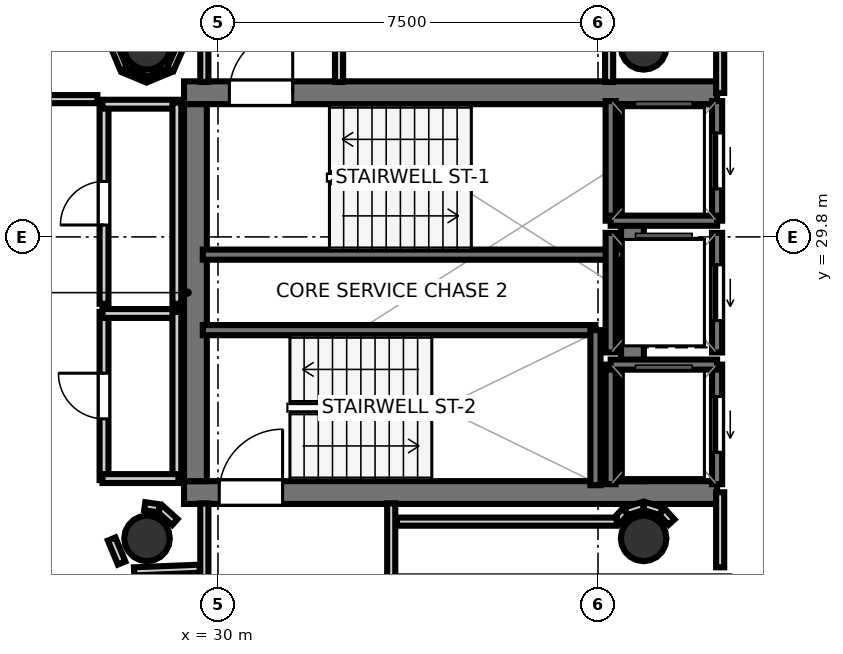
"""IFC4 building model, lengths in metres.
Left out: names, types, materials, properties, quantities, classifications, styles, units other than length and angle.
Written with IfcOpenShell. Run it as: python <this file> out.ifc"""

import sys

from ifc_helpers import new_model, si_unit, direction, frame, frame_2d, origin, origin_2d, place, context, subcontext, project, spatial, rectangle, hollow_circle, extrude, element, fill, save


model = new_model("IFC4")
c1 = context("Model", 3, precision=1e-05, world=origin(), true_north=direction((0.0, 1.0)))
c2 = subcontext(c1, "Body", "Model", "MODEL_VIEW")
j1 = project(units=[si_unit("LENGTHUNIT", "METRE"), si_unit("PLANEANGLEUNIT", "RADIAN")], contexts=[c1])
p1 = place(None, origin())
s1 = spatial("IfcSite", under=j1, at=p1, CompositionType="ELEMENT")
p2 = place(p1, origin())
s2 = spatial("IfcBuilding", under=s1, at=p2, CompositionType="ELEMENT")
p3 = place(p2, frame((0.0, 0.0, 288.0)))
s3 = spatial("IfcBuildingStorey", under=s2, at=p3, CompositionType="ELEMENT", Elevation=288.0)
p4 = place(p3, frame((29.33, 32.645, 0.0), z_axis=(0.0, 0.0, 1.0), x_axis=(1.0, 0.0, 0.0)))
e1 = element("IfcWall", 1, at=p4, inside=s3, PredefinedType="SHEAR", context=c2, shape_type="SweptSolid", body=[
    extrude(rectangle(XDim=10.52, YDim=0.45, at=frame_2d((5.26, 0.0))), origin(), (0.0, 0.0, 1.0), 3.52),
])
p5 = place(p4, frame((0.895, 0.0, 0.0)))
e2 = element("IfcOpeningElement", 2, at=p5, cuts=e1, PredefinedType="OPENING", context=c2, shape_type="SweptSolid", body=[
    extrude(rectangle(XDim=1.25, YDim=2.15, at=frame_2d((0.625, 1.075))), frame((0.0, 0.235, 0.0), z_axis=(0.0, -1.0, 0.0), x_axis=(1.0, 0.0, 0.0)), (0.0, 0.0, 1.0), 0.47),
])
p6 = place(p3, frame((29.33, 24.755, 0.0), z_axis=(0.0, 0.0, 1.0), x_axis=(1.0, 0.0, 0.0)))
e3 = element("IfcWall", 3, at=p6, inside=s3, PredefinedType="SHEAR", context=c2, shape_type="SweptSolid", body=[
    extrude(rectangle(XDim=10.52, YDim=0.45, at=frame_2d((5.26, 0.0))), origin(), (0.0, 0.0, 1.0), 3.52),
])
p7 = place(p6, frame((0.695, 0.0, 0.0)))
e4 = element("IfcOpeningElement", 4, at=p7, cuts=e3, PredefinedType="OPENING", context=c2, shape_type="SweptSolid", body=[
    extrude(rectangle(XDim=1.25, YDim=2.15, at=frame_2d((0.625, 1.075))), frame((0.0, 0.235, 0.0), z_axis=(0.0, -1.0, 0.0), x_axis=(1.0, 0.0, 0.0)), (0.0, 0.0, 1.0), 0.47),
])
for number, where, z_axis, x_axis in (
    (5, (29.555, 24.98, 0.0), (0.0, 0.0, 1.0), (0.0, 1.0, 0.0)),
    (6, (38.18, 24.98, 0.0), (0.0, 0.0, 1.0), (0.0, 1.0, 0.0)),
):
    element("IfcWall", number, at=place(p3, frame(where, z_axis=z_axis, x_axis=x_axis)), inside=s3, PredefinedType="SHEAR", context=c2, shape_type="SweptSolid", body=[
        extrude(rectangle(XDim=7.44, YDim=0.45, at=frame_2d((3.72, 0.0))), origin(), (0.0, 0.0, 1.0), 3.52),
    ])
for number, where, z_axis, x_axis in (
    (7, (28.6, 33.55, 0.0), (0.0, 0.0, 1.0), (1.0, 0.0, 0.0)),
    (8, (28.6, 23.85, 0.0), (0.0, 0.0, 1.0), (1.0, 0.0, 0.0)),
    (9, (38.4, 33.55, 0.0), (0.0, 0.0, 1.0), (1.0, 0.0, 0.0)),
    (10, (38.4, 23.85, 0.0), (0.0, 0.0, 1.0), (1.0, 0.0, 0.0)),
):
    element("IfcColumn", number, at=place(p3, frame(where, z_axis=z_axis, x_axis=x_axis)), inside=s3, PredefinedType="COLUMN", context=c2, shape_type="SweptSolid", body=[
        extrude(hollow_circle(Radius=0.45, WallThickness=0.025, at=origin_2d()), origin(), (0.0, 0.0, 1.0), 3.7),
    ])
p8 = place(p3, frame((29.7, 29.45, 0.0), z_axis=(0.0, 0.0, 1.0), x_axis=(1.0, 0.0, 0.0)))
e11 = element("IfcWall", 11, at=p8, inside=s3, PredefinedType="SOLIDWALL", context=c2, shape_type="SweptSolid", body=[
    extrude(rectangle(XDim=8.3, YDim=0.2, at=frame_2d((4.15, 0.0))), origin(), (0.0, 0.0, 1.0), 3.52),
])
p9 = place(p3, frame((29.7, 27.96, 0.0), z_axis=(0.0, 0.0, 1.0), x_axis=(1.0, 0.0, 0.0)))
e12 = element("IfcWall", 12, at=p9, inside=s3, PredefinedType="SOLIDWALL", context=c2, shape_type="SweptSolid", body=[
    extrude(rectangle(XDim=7.75, YDim=0.2, at=frame_2d((3.875, 0.0))), origin(), (0.0, 0.0, 1.0), 3.52),
])
p10 = place(p3, frame((37.45, 24.9, 0.0), z_axis=(0.0, 0.0, 1.0), x_axis=(0.0, 1.0, 0.0)))
e13 = element("IfcWall", 13, at=p10, inside=s3, PredefinedType="SOLIDWALL", context=c2, shape_type="SweptSolid", body=[
    extrude(rectangle(XDim=3.06, YDim=0.2, at=frame_2d((1.53, 0.0))), origin(), (0.0, 0.0, 1.0), 3.52),
])
p11 = place(p3, frame((39.85, 30.12, 0.0), z_axis=(0.0, 0.0, 1.0), x_axis=(0.0, 1.0, 0.0)))
e14 = element("IfcWall", 14, at=p11, inside=s3, PredefinedType="SOLIDWALL", context=c2, shape_type="SweptSolid", body=[
    extrude(rectangle(XDim=2.36, YDim=0.2, at=frame_2d((1.18, 0.0))), origin(), (0.0, 0.0, 1.0), 3.52),
])
p12 = place(p11, frame((0.63, 0.0, 0.0)))
e15 = element("IfcOpeningElement", 15, at=p12, cuts=e14, PredefinedType="OPENING", context=c2, shape_type="SweptSolid", body=[
    extrude(rectangle(XDim=1.1, YDim=2.15, at=frame_2d((0.55, 1.075))), frame((0.0, 0.11, 0.0), z_axis=(0.0, -1.0, 0.0), x_axis=(1.0, 0.0, 0.0)), (0.0, 0.0, 1.0), 0.22),
])
p13 = place(p3, frame((37.75, 30.12, 0.0), z_axis=(0.0, 0.0, 1.0), x_axis=(0.0, 1.0, 0.0)))
e16 = element("IfcWall", 16, at=p13, inside=s3, PredefinedType="SOLIDWALL", context=c2, shape_type="SweptSolid", body=[
    extrude(rectangle(XDim=2.36, YDim=0.2, at=frame_2d((1.18, 0.0))), origin(), (0.0, 0.0, 1.0), 3.52),
])
p14 = place(p3, frame((37.75, 30.12, 0.0), z_axis=(0.0, 0.0, 1.0), x_axis=(1.0, 0.0, 0.0)))
e17 = element("IfcWall", 17, at=p14, inside=s3, PredefinedType="SOLIDWALL", context=c2, shape_type="SweptSolid", body=[
    extrude(rectangle(XDim=2.1, YDim=0.2, at=frame_2d((1.05, 0.0))), origin(), (0.0, 0.0, 1.0), 3.52),
])
p15 = place(p3, frame((39.85, 24.92, 0.0), z_axis=(0.0, 0.0, 1.0), x_axis=(0.0, 1.0, 0.0)))
e18 = element("IfcWall", 18, at=p15, inside=s3, PredefinedType="SOLIDWALL", context=c2, shape_type="SweptSolid", body=[
    extrude(rectangle(XDim=2.36, YDim=0.2, at=frame_2d((1.18, 0.0))), origin(), (0.0, 0.0, 1.0), 3.52),
])
p16 = place(p15, frame((0.63, 0.0, 0.0)))
e19 = element("IfcOpeningElement", 19, at=p16, cuts=e18, PredefinedType="OPENING", context=c2, shape_type="SweptSolid", body=[
    extrude(rectangle(XDim=1.1, YDim=2.15, at=frame_2d((0.55, 1.075))), frame((0.0, 0.11, 0.0), z_axis=(0.0, -1.0, 0.0), x_axis=(1.0, 0.0, 0.0)), (0.0, 0.0, 1.0), 0.22),
])
p17 = place(p3, frame((37.75, 24.92, 0.0), z_axis=(0.0, 0.0, 1.0), x_axis=(0.0, 1.0, 0.0)))
e20 = element("IfcWall", 20, at=p17, inside=s3, PredefinedType="SOLIDWALL", context=c2, shape_type="SweptSolid", body=[
    extrude(rectangle(XDim=2.36, YDim=0.2, at=frame_2d((1.18, 0.0))), origin(), (0.0, 0.0, 1.0), 3.52),
])
p18 = place(p3, frame((37.75, 27.28, 0.0), z_axis=(0.0, 0.0, 1.0), x_axis=(1.0, 0.0, 0.0)))
e21 = element("IfcWall", 21, at=p18, inside=s3, PredefinedType="SOLIDWALL", context=c2, shape_type="SweptSolid", body=[
    extrude(rectangle(XDim=2.1, YDim=0.2, at=frame_2d((1.05, 0.0))), origin(), (0.0, 0.0, 1.0), 3.52),
])
p19 = place(p3, frame((39.85, 27.52, 0.0), z_axis=(0.0, 0.0, 1.0), x_axis=(0.0, 1.0, 0.0)))
e22 = element("IfcWall", 22, at=p19, inside=s3, PredefinedType="SOLIDWALL", context=c2, shape_type="SweptSolid", body=[
    extrude(rectangle(XDim=2.36, YDim=0.2, at=frame_2d((1.18, 0.0))), origin(), (0.0, 0.0, 1.0), 3.52),
])
p20 = place(p19, frame((0.63, 0.0, 0.0)))
e23 = element("IfcOpeningElement", 23, at=p20, cuts=e22, PredefinedType="OPENING", context=c2, shape_type="SweptSolid", body=[
    extrude(rectangle(XDim=1.1, YDim=2.15, at=frame_2d((0.55, 1.075))), frame((0.0, 0.11, 0.0), z_axis=(0.0, -1.0, 0.0), x_axis=(1.0, 0.0, 0.0)), (0.0, 0.0, 1.0), 0.22),
])
p21 = place(p3, frame((37.75, 27.52, 0.0), z_axis=(0.0, 0.0, 1.0), x_axis=(0.0, 1.0, 0.0)))
e24 = element("IfcWall", 24, at=p21, inside=s3, PredefinedType="SOLIDWALL", context=c2, shape_type="SweptSolid", body=[
    extrude(rectangle(XDim=2.36, YDim=0.2, at=frame_2d((1.18, 0.0))), origin(), (0.0, 0.0, 1.0), 3.52),
])
p22 = place(p3, frame((29.731, 32.858, 0.0), z_axis=(0.0, 0.0, 1.0), x_axis=(0.0, 1.0, 0.0)))
e25 = element("IfcWall", 25, at=p22, inside=s3, PredefinedType="PARTITIONING", context=c2, shape_type="SweptSolid", body=[
    extrude(rectangle(XDim=3.053, YDim=0.16, at=frame_2d((1.526, 0.0))), origin(), (0.0, 0.0, 1.0), 2.84),
])
p23 = place(p3, frame((32.389, 36.29, 0.0), z_axis=(0.0, 0.0, 1.0), x_axis=(0.0, -1.0, 0.0)))
e26 = element("IfcWall", 26, at=p23, inside=s3, PredefinedType="PARTITIONING", context=c2, shape_type="SweptSolid", body=[
    extrude(rectangle(XDim=3.432, YDim=0.16, at=frame_2d((1.716, 0.0))), origin(), (0.0, 0.0, 1.0), 2.84),
])
for number, where, z_axis, x_axis in (
    (27, (29.731, 21.85, 0.0), (0.0, 0.0, 1.0), (0.0, 1.0, 0.0)),
    (28, (33.419, 24.542, 0.0), (0.0, 0.0, 1.0), (0.0, -1.0, 0.0)),
):
    element("IfcWall", number, at=place(p3, frame(where, z_axis=z_axis, x_axis=x_axis)), inside=s3, PredefinedType="PARTITIONING", context=c2, shape_type="SweptSolid", body=[
        extrude(rectangle(XDim=2.692, YDim=0.16, at=frame_2d((1.346, 0.0))), origin(), (0.0, 0.0, 1.0), 2.84),
    ])
p24 = place(p3, frame((39.911, 23.28, 0.0), z_axis=(0.0, 0.0, 1.0), x_axis=(0.0, 1.0, 0.0)))
e29 = element("IfcWall", 29, at=p24, inside=s3, PredefinedType="PARTITIONING", context=c2, shape_type="SweptSolid", body=[
    extrude(rectangle(XDim=1.48, YDim=0.16, at=frame_2d((0.74, 0.0))), origin(), (0.0, 0.0, 1.0), 2.84),
])
p25 = place(p3, frame((39.911, 32.64, 0.0), z_axis=(0.0, 0.0, 1.0), x_axis=(0.0, 1.0, 0.0)))
e30 = element("IfcWall", 30, at=p25, inside=s3, PredefinedType="PARTITIONING", context=c2, shape_type="SweptSolid", body=[
    extrude(rectangle(XDim=2.88, YDim=0.16, at=frame_2d((1.44, 0.0))), origin(), (0.0, 0.0, 1.0), 2.84),
])
p26 = place(p3, frame((27.751, 25.0, 0.0), z_axis=(0.0, 0.0, 1.0), x_axis=(0.0, 1.0, 0.0)))
e31 = element("IfcWall", 31, at=p26, inside=s3, PredefinedType="PLUMBINGWALL", context=c2, shape_type="SweptSolid", body=[
    extrude(rectangle(XDim=3.32, YDim=0.175, at=frame_2d((1.66, 0.0))), origin(), (0.0, 0.0, 1.0), 2.84),
])
p27 = place(p26, frame((1.21, 0.0, 0.0)))
e32 = element("IfcOpeningElement", 32, at=p27, cuts=e31, PredefinedType="OPENING", context=c2, shape_type="SweptSolid", body=[
    extrude(rectangle(XDim=0.9, YDim=2.1, at=frame_2d((0.45, 1.05))), frame((0.0, 0.097, 0.0), z_axis=(0.0, -1.0, 0.0), x_axis=(1.0, 0.0, 0.0)), (0.0, 0.0, 1.0), 0.195),
])
p28 = place(p3, frame((27.72, 28.289, 0.0), z_axis=(0.0, 0.0, 1.0), x_axis=(1.0, 0.0, 0.0)))
e33 = element("IfcWall", 33, at=p28, inside=s3, PredefinedType="PLUMBINGWALL", context=c2, shape_type="SweptSolid", body=[
    extrude(rectangle(XDim=1.5, YDim=0.175, at=frame_2d((0.75, 0.0))), origin(), (0.0, 0.0, 1.0), 2.84),
])
p29 = place(p3, frame((29.189, 28.32, 0.0), z_axis=(0.0, 0.0, 1.0), x_axis=(0.0, -1.0, 0.0)))
e34 = element("IfcWall", 34, at=p29, inside=s3, PredefinedType="PLUMBINGWALL", context=c2, shape_type="SweptSolid", body=[
    extrude(rectangle(XDim=3.32, YDim=0.175, at=frame_2d((1.66, 0.0))), origin(), (0.0, 0.0, 1.0), 2.84),
])
p30 = place(p3, frame((29.22, 25.031, 0.0), z_axis=(0.0, 0.0, 1.0), x_axis=(-1.0, 0.0, 0.0)))
e35 = element("IfcWall", 35, at=p30, inside=s3, PredefinedType="PLUMBINGWALL", context=c2, shape_type="SweptSolid", body=[
    extrude(rectangle(XDim=1.5, YDim=0.175, at=frame_2d((0.75, 0.0))), origin(), (0.0, 0.0, 1.0), 2.84),
])
p31 = place(p3, frame((27.751, 28.48, 0.0), z_axis=(0.0, 0.0, 1.0), x_axis=(0.0, 1.0, 0.0)))
e36 = element("IfcWall", 36, at=p31, inside=s3, PredefinedType="PLUMBINGWALL", context=c2, shape_type="SweptSolid", body=[
    extrude(rectangle(XDim=3.97, YDim=0.175, at=frame_2d((1.985, 0.0))), origin(), (0.0, 0.0, 1.0), 2.84),
])
p32 = place(p31, frame((1.555, 0.0, 0.0)))
e37 = element("IfcOpeningElement", 37, at=p32, cuts=e36, PredefinedType="OPENING", context=c2, shape_type="SweptSolid", body=[
    extrude(rectangle(XDim=0.86, YDim=2.05, at=frame_2d((0.43, 1.025))), frame((0.0, 0.097, 0.0), z_axis=(0.0, -1.0, 0.0), x_axis=(1.0, 0.0, 0.0)), (0.0, 0.0, 1.0), 0.195),
])
p33 = place(p3, frame((27.72, 32.419, 0.0), z_axis=(0.0, 0.0, 1.0), x_axis=(1.0, 0.0, 0.0)))
e38 = element("IfcWall", 38, at=p33, inside=s3, PredefinedType="PLUMBINGWALL", context=c2, shape_type="SweptSolid", body=[
    extrude(rectangle(XDim=1.5, YDim=0.175, at=frame_2d((0.75, 0.0))), origin(), (0.0, 0.0, 1.0), 2.84),
])
p34 = place(p3, frame((29.189, 32.45, 0.0), z_axis=(0.0, 0.0, 1.0), x_axis=(0.0, -1.0, 0.0)))
e39 = element("IfcWall", 39, at=p34, inside=s3, PredefinedType="PLUMBINGWALL", context=c2, shape_type="SweptSolid", body=[
    extrude(rectangle(XDim=3.97, YDim=0.175, at=frame_2d((1.985, 0.0))), origin(), (0.0, 0.0, 1.0), 2.84),
])
p35 = place(p3, frame((38.951, 24.171, 0.0), z_axis=(0.0, 0.0, 1.0), x_axis=(-0.674186852077, 0.738560822469, 0.0)))
e40 = element("IfcWall", 40, at=p35, inside=s3, PredefinedType="PARTITIONING", context=c2, shape_type="SweptSolid", body=[
    extrude(rectangle(XDim=0.281, YDim=0.16, at=frame_2d((0.14, 0.0))), origin(), (0.0, 0.0, 1.0), 2.84),
])
p36 = place(p3, frame((38.748, 24.387, 0.0), z_axis=(0.0, 0.0, 1.0), x_axis=(-0.956948991291, 0.290256142171, 0.0)))
e41 = element("IfcWall", 41, at=p36, inside=s3, PredefinedType="PARTITIONING", context=c2, shape_type="SweptSolid", body=[
    extrude(rectangle(XDim=0.354, YDim=0.16, at=frame_2d((0.177, 0.0))), origin(), (0.0, 0.0, 1.0), 2.84),
])
p37 = place(p3, frame((38.391, 24.49, 0.0), z_axis=(0.0, 0.0, 1.0), x_axis=(-0.957007018611, -0.290064762301, 0.0)))
e42 = element("IfcWall", 42, at=p37, inside=s3, PredefinedType="PARTITIONING", context=c2, shape_type="SweptSolid", body=[
    extrude(rectangle(XDim=0.354, YDim=0.16, at=frame_2d((0.177, 0.0))), origin(), (0.0, 0.0, 1.0), 2.84),
])
p38 = place(p3, frame((38.038, 24.378, 0.0), z_axis=(0.0, 0.0, 1.0), x_axis=(-0.673658387955, -0.739042878551, 0.0)))
e43 = element("IfcWall", 43, at=p38, inside=s3, PredefinedType="PARTITIONING", context=c2, shape_type="SweptSolid", body=[
    extrude(rectangle(XDim=0.246, YDim=0.16, at=frame_2d((0.123, 0.0))), origin(), (0.0, 0.0, 1.0), 2.84),
])
p39 = place(p3, frame((37.872, 24.181, 0.0), z_axis=(0.0, 0.0, 1.0), x_axis=(-1.0, 0.0, 0.0)))
e44 = element("IfcWall", 44, at=p39, inside=s3, PredefinedType="PARTITIONING", context=c2, shape_type="SweptSolid", body=[
    extrude(rectangle(XDim=4.342, YDim=0.16, at=frame_2d((2.171, 0.0))), origin(), (0.0, 0.0, 1.0), 2.84),
])
p40 = place(p3, frame((29.149, 24.173, 0.0), z_axis=(0.0, 0.0, 1.0), x_axis=(-0.745225165416, 0.666812906917, 0.0)))
e45 = element("IfcWall", 45, at=p40, inside=s3, PredefinedType="PARTITIONING", context=c2, shape_type="SweptSolid", body=[
    extrude(rectangle(XDim=0.396, YDim=0.16, at=frame_2d((0.198, 0.0))), origin(), (0.0, 0.0, 1.0), 2.84),
])
p41 = place(p3, frame((28.838, 24.444, 0.0), z_axis=(0.0, 0.0, 1.0), x_axis=(-0.989449148305, 0.144880581578, 0.0)))
e46 = element("IfcWall", 46, at=p41, inside=s3, PredefinedType="PARTITIONING", context=c2, shape_type="SweptSolid", body=[
    extrude(rectangle(XDim=0.286, YDim=0.16, at=frame_2d((0.143, 0.0))), origin(), (0.0, 0.0, 1.0), 2.84),
])
p42 = place(p3, frame((37.719, 35.5, 0.0), z_axis=(0.0, 0.0, 1.0), x_axis=(0.0, -1.0, 0.0)))
e47 = element("IfcWall", 47, at=p42, inside=s3, PredefinedType="PARTITIONING", context=c2, shape_type="SweptSolid", body=[
    extrude(rectangle(XDim=2.642, YDim=0.16, at=frame_2d((1.321, 0.0))), origin(), (0.0, 0.0, 1.0), 2.84),
])
p43 = place(p3, frame((27.901, 23.838, 0.0), z_axis=(0.0, 0.0, 1.0), x_axis=(0.382856448334, -0.923807847969, 0.0)))
e48 = element("IfcWall", 48, at=p43, inside=s3, PredefinedType="PARTITIONING", context=c2, shape_type="SweptSolid", body=[
    extrude(rectangle(XDim=0.513, YDim=0.16, at=frame_2d((0.256, 0.0))), origin(), (0.0, 0.0, 1.0), 2.84),
])
p44 = place(p3, frame((28.345, 23.2, 0.0), z_axis=(0.0, 0.0, 1.0), x_axis=(0.999216536924, 0.039576664043, 0.0)))
e49 = element("IfcWall", 49, at=p44, inside=s3, PredefinedType="PARTITIONING", context=c2, shape_type="SweptSolid", body=[
    extrude(rectangle(XDim=1.295, YDim=0.16, at=frame_2d((0.648, 0.0))), origin(), (0.0, 0.0, 1.0), 2.84),
])
p45 = place(p3, frame((25.65, 32.519, 0.0), z_axis=(0.0, 0.0, 1.0), x_axis=(1.0, 0.0, 0.0)))
e50 = element("IfcWall", 50, at=p45, inside=s3, PredefinedType="PARTITIONING", context=c2, shape_type="SweptSolid", body=[
    extrude(rectangle(XDim=1.97, YDim=0.16, at=frame_2d((0.985, 0.0))), origin(), (0.0, 0.0, 1.0), 2.84),
])
p46 = place(p3, frame((56.387, 35.955, 0.0), z_axis=(0.0, 0.0, 1.0), x_axis=(-0.547085490545, -0.837076738439, 0.0)))
e51 = element("IfcWall", 51, at=p46, inside=s3, PredefinedType="PARTITIONING", context=c2, shape_type="SweptSolid", body=[
    extrude(rectangle(XDim=34.443, YDim=0.12, at=frame_2d((17.221, 0.0))), origin(), (0.0, 0.0, 1.0), 2.84),
])
p47 = place(p3, frame((27.961, 33.538, 0.0), z_axis=(0.0, 0.0, 1.0), x_axis=(0.382274809242, -0.924048683901, 0.0)))
e52 = element("IfcWall", 52, at=p47, inside=s3, PredefinedType="PARTITIONING", context=c2, shape_type="SweptSolid", body=[
    extrude(rectangle(XDim=0.467, YDim=0.14, at=frame_2d((0.233, 0.0))), origin(), (0.0, 0.0, 1.0), 2.84),
])
p48 = place(p3, frame((28.157, 33.09, 0.0), z_axis=(0.0, 0.0, 1.0), x_axis=(0.923863886655, -0.382721202621, 0.0)))
e53 = element("IfcWall", 53, at=p48, inside=s3, PredefinedType="PARTITIONING", context=c2, shape_type="SweptSolid", body=[
    extrude(rectangle(XDim=0.467, YDim=0.12, at=frame_2d((0.233, 0.0))), origin(), (0.0, 0.0, 1.0), 2.84),
])
p49 = place(p3, frame((28.612, 32.911, 0.0), z_axis=(0.0, 0.0, 1.0), x_axis=(0.923863886655, 0.382721202621, 0.0)))
e54 = element("IfcWall", 54, at=p49, inside=s3, PredefinedType="PARTITIONING", context=c2, shape_type="SweptSolid", body=[
    extrude(rectangle(XDim=0.467, YDim=0.105, at=frame_2d((0.233, 0.0))), origin(), (0.0, 0.0, 1.0), 2.84),
])
p50 = place(p3, frame((29.06, 33.106, 0.0), z_axis=(0.0, 0.0, 1.0), x_axis=(0.400352069216, 0.916361402872, 0.0)))
e55 = element("IfcWall", 55, at=p50, inside=s3, PredefinedType="PARTITIONING", context=c2, shape_type="SweptSolid", body=[
    extrude(rectangle(XDim=0.439, YDim=0.14, at=frame_2d((0.219, 0.0))), origin(), (0.0, 0.0, 1.0), 2.84),
])
p51 = place(p5, origin())
e56 = element("IfcDoor", 56, at=p51, inside=s3, OperationType="SINGLE_SWING_RIGHT", PredefinedType="DOOR", context=c2, shape_type="SweptSolid", body=[
    extrude(rectangle(XDim=1.25, YDim=2.15, at=frame_2d((0.625, 1.075))), frame((0.0, 0.025, 0.0), z_axis=(0.0, -1.0, 0.0), x_axis=(1.0, 0.0, 0.0)), (0.0, 0.0, 1.0), 0.05),
])
fill(e2, e56)
p52 = place(p7, origin())
e57 = element("IfcDoor", 57, at=p52, inside=s3, OperationType="SINGLE_SWING_RIGHT", PredefinedType="DOOR", context=c2, shape_type="SweptSolid", body=[
    extrude(rectangle(XDim=1.25, YDim=2.15, at=frame_2d((0.625, 1.075))), frame((0.0, 0.025, 0.0), z_axis=(0.0, -1.0, 0.0), x_axis=(1.0, 0.0, 0.0)), (0.0, 0.0, 1.0), 0.05),
])
fill(e4, e57)
p53 = place(p12, origin())
e58 = element("IfcDoor", 58, at=p53, inside=s3, OperationType="SLIDING_TO_LEFT", PredefinedType="DOOR", context=c2, shape_type="SweptSolid", body=[
    extrude(rectangle(XDim=1.1, YDim=2.15, at=frame_2d((0.55, 1.075))), frame((0.0, 0.025, 0.0), z_axis=(0.0, -1.0, 0.0), x_axis=(1.0, 0.0, 0.0)), (0.0, 0.0, 1.0), 0.05),
])
fill(e15, e58)
p54 = place(p16, origin())
e59 = element("IfcDoor", 59, at=p54, inside=s3, OperationType="SLIDING_TO_LEFT", PredefinedType="DOOR", context=c2, shape_type="SweptSolid", body=[
    extrude(rectangle(XDim=1.1, YDim=2.15, at=frame_2d((0.55, 1.075))), frame((0.0, 0.025, 0.0), z_axis=(0.0, -1.0, 0.0), x_axis=(1.0, 0.0, 0.0)), (0.0, 0.0, 1.0), 0.05),
])
fill(e19, e59)
p55 = place(p20, origin())
e60 = element("IfcDoor", 60, at=p55, inside=s3, OperationType="SLIDING_TO_LEFT", PredefinedType="DOOR", context=c2, shape_type="SweptSolid", body=[
    extrude(rectangle(XDim=1.1, YDim=2.15, at=frame_2d((0.55, 1.075))), frame((0.0, 0.025, 0.0), z_axis=(0.0, -1.0, 0.0), x_axis=(1.0, 0.0, 0.0)), (0.0, 0.0, 1.0), 0.05),
])
fill(e23, e60)
p56 = place(p27, origin())
e61 = element("IfcDoor", 61, at=p56, inside=s3, OperationType="SINGLE_SWING_RIGHT", PredefinedType="DOOR", context=c2, shape_type="SweptSolid", body=[
    extrude(rectangle(XDim=0.9, YDim=2.1, at=frame_2d((0.45, 1.05))), frame((0.0, 0.025, 0.0), z_axis=(0.0, -1.0, 0.0), x_axis=(1.0, 0.0, 0.0)), (0.0, 0.0, 1.0), 0.05),
])
fill(e32, e61)
p57 = place(p32, origin())
e62 = element("IfcDoor", 62, at=p57, inside=s3, OperationType="SINGLE_SWING_LEFT", PredefinedType="DOOR", context=c2, shape_type="SweptSolid", body=[
    extrude(rectangle(XDim=0.86, YDim=2.05, at=frame_2d((0.43, 1.025))), frame((0.0, 0.025, 0.0), z_axis=(0.0, -1.0, 0.0), x_axis=(1.0, 0.0, 0.0)), (0.0, 0.0, 1.0), 0.05),
])
fill(e37, e62)
save(model, sys.argv[1])
